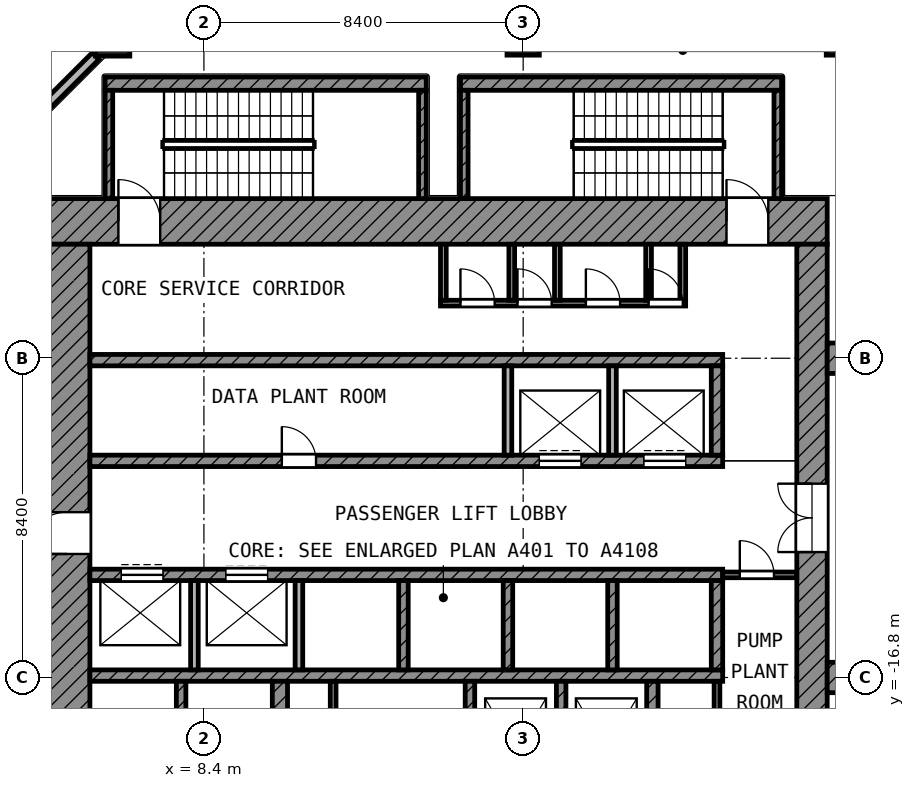
"""IFC4 building model, lengths in metres.
Left out: names, types, materials, properties, quantities, classifications, styles, units other than length and angle.
Written with IfcOpenShell. Run it as: python <this file> out.ifc"""

import sys

from ifc_helpers import new_model, si_unit, direction, frame, frame_2d, origin, origin_2d, place, context, subcontext, project, spatial, rectangle, extrude, element, fill, save


model = new_model("IFC4")
c1 = context("Model", 3, precision=1e-05, world=origin(), true_north=direction((0.0, 1.0)))
c2 = subcontext(c1, "Body", "Model", "MODEL_VIEW")
j1 = project(units=[si_unit("LENGTHUNIT", "METRE"), si_unit("PLANEANGLEUNIT", "RADIAN")], contexts=[c1])
p1 = place(None, origin())
s1 = spatial("IfcSite", under=j1, at=p1, CompositionType="ELEMENT")
p2 = place(p1, origin())
s2 = spatial("IfcBuilding", under=s1, at=p2, CompositionType="ELEMENT")
p3 = place(p2, frame((0.0, 0.0, 213.0)))
s3 = spatial("IfcBuildingStorey", under=s2, at=p3, CompositionType="ELEMENT", Elevation=213.0)
p4 = place(p3, frame((6.0, 0.0, 0.0), z_axis=(0.0, 0.0, 1.0), x_axis=(1.0, 0.0, 0.0)))
e1 = element("IfcColumn", 1, at=p4, inside=s3, PredefinedType="COLUMN", context=c2, shape_type="SweptSolid", body=[
    extrude(rectangle(XDim=0.9, YDim=0.9, at=origin_2d()), origin(), (0.0, 0.0, 1.0), 5.0),
])
for number, where, z_axis, x_axis in (
    (2, (16.8, 0.0, 0.0), (0.0, 0.0, 1.0), (1.0, 0.0, 0.0)),
    (3, (25.2, 0.0, 0.0), (0.0, 0.0, 1.0), (1.0, 0.0, 0.0)),
):
    element("IfcColumn", number, at=place(p3, frame(where, z_axis=z_axis, x_axis=x_axis)), inside=s3, PredefinedType="COLUMN", context=c2, shape_type="SweptSolid", body=[
        extrude(rectangle(XDim=0.85, YDim=0.85, at=origin_2d()), origin(), (0.0, 0.0, 1.0), 5.0),
    ])
for number, where, z_axis, x_axis in (
    (4, (24.8, -8.4, 0.0), (0.0, 0.0, 1.0), (1.0, 0.0, 0.0)),
    (5, (24.8, -16.8, 0.0), (0.0, 0.0, 1.0), (1.0, 0.0, 0.0)),
):
    element("IfcWall", number, at=place(p3, frame(where, z_axis=z_axis, x_axis=x_axis)), inside=s3, PredefinedType="SHEAR", context=c2, shape_type="SweptSolid", body=[
        extrude(rectangle(XDim=8.35, YDim=0.8, at=frame_2d((4.175, 0.0))), origin(), (0.0, 0.0, 1.0), 4.4),
    ])
p5 = place(p3, frame((5.55, -0.45, 0.0), z_axis=(0.0, 0.0, 1.0), x_axis=(-0.707106781187, -0.707106781187, 0.0)))
e6 = element("IfcWall", 6, at=p5, inside=s3, PredefinedType="SOLIDWALL", context=c2, shape_type="SweptSolid", body=[
    extrude(rectangle(XDim=7.213, YDim=0.25, at=frame_2d((3.606, 0.0))), origin(), (0.0, 0.0, 1.0), 3.2),
])
p6 = place(p3, frame((4.2, -4.8, 0.0), z_axis=(0.0, 0.0, 1.0), x_axis=(1.0, 0.0, 0.0)))
e7 = element("IfcWall", 7, at=p6, inside=s3, PredefinedType="SHEAR", context=c2, shape_type="SweptSolid", body=[
    extrude(rectangle(XDim=20.6, YDim=1.2, at=frame_2d((10.3, 0.0))), origin(), (0.0, 0.0, 1.0), 4.4),
])
p7 = place(p6, frame((1.95, 0.0, 0.0)))
e8 = element("IfcOpeningElement", 8, at=p7, cuts=e7, PredefinedType="OPENING", context=c2, shape_type="SweptSolid", body=[
    extrude(rectangle(XDim=1.1, YDim=2.1, at=frame_2d((0.55, 1.05))), frame((0.0, 0.61, 0.0), z_axis=(0.0, -1.0, 0.0), x_axis=(1.0, 0.0, 0.0)), (0.0, 0.0, 1.0), 1.22),
])
p8 = place(p6, frame((17.95, 0.0, 0.0)))
e9 = element("IfcOpeningElement", 9, at=p8, cuts=e7, PredefinedType="OPENING", context=c2, shape_type="SweptSolid", body=[
    extrude(rectangle(XDim=1.1, YDim=2.1, at=frame_2d((0.55, 1.05))), frame((0.0, 0.61, 0.0), z_axis=(0.0, -1.0, 0.0), x_axis=(1.0, 0.0, 0.0)), (0.0, 0.0, 1.0), 1.22),
])
p9 = place(p3, frame((4.8, -24.8, 0.0), z_axis=(0.0, 0.0, 1.0), x_axis=(0.0, 1.0, 0.0)))
e10 = element("IfcWall", 10, at=p9, inside=s3, PredefinedType="SHEAR", context=c2, shape_type="SweptSolid", body=[
    extrude(rectangle(XDim=19.4, YDim=1.2, at=frame_2d((9.7, 0.0))), origin(), (0.0, 0.0, 1.0), 4.4),
])
p10 = place(p9, frame((11.25, 0.0, 0.0)))
e11 = element("IfcOpeningElement", 11, at=p10, cuts=e10, PredefinedType="OPENING", context=c2, shape_type="SweptSolid", body=[
    extrude(rectangle(XDim=1.1, YDim=2.1, at=frame_2d((0.55, 1.05))), frame((0.0, 0.61, 0.0), z_axis=(0.0, -1.0, 0.0), x_axis=(1.0, 0.0, 0.0)), (0.0, 0.0, 1.0), 1.22),
])
p11 = place(p9, frame((1.95, 0.0, 0.0)))
e12 = element("IfcOpeningElement", 12, at=p11, cuts=e10, PredefinedType="OPENING", context=c2, shape_type="SweptSolid", body=[
    extrude(rectangle(XDim=1.1, YDim=2.1, at=frame_2d((0.55, 1.05))), frame((0.0, 0.61, 0.0), z_axis=(0.0, -1.0, 0.0), x_axis=(1.0, 0.0, 0.0)), (0.0, 0.0, 1.0), 1.22),
])
p12 = place(p3, frame((24.4, -24.0, 0.0), z_axis=(0.0, 0.0, 1.0), x_axis=(0.0, 1.0, 0.0)))
e13 = element("IfcWall", 13, at=p12, inside=s3, PredefinedType="SHEAR", context=c2, shape_type="SweptSolid", body=[
    extrude(rectangle(XDim=18.6, YDim=0.8, at=frame_2d((9.3, 0.0))), origin(), (0.0, 0.0, 1.0), 4.4),
])
p13 = place(p12, frame((10.5, 0.0, 0.0)))
e14 = element("IfcOpeningElement", 14, at=p13, cuts=e13, PredefinedType="OPENING", context=c2, shape_type="SweptSolid", body=[
    extrude(rectangle(XDim=1.8, YDim=2.1, at=frame_2d((0.9, 1.05))), frame((0.0, 0.41, 0.0), z_axis=(0.0, -1.0, 0.0), x_axis=(1.0, 0.0, 0.0)), (0.0, 0.0, 1.0), 0.82),
])
p14 = place(p3, frame((5.4, -8.45, 0.0), z_axis=(0.0, 0.0, 1.0), x_axis=(1.0, 0.0, 0.0)))
e15 = element("IfcWall", 15, at=p14, inside=s3, PredefinedType="SHEAR", context=c2, shape_type="SweptSolid", body=[
    extrude(rectangle(XDim=16.65, YDim=0.3, at=frame_2d((8.325, 0.0))), origin(), (0.0, 0.0, 1.0), 4.4),
])
p15 = place(p3, frame((5.4, -11.1, 0.0), z_axis=(0.0, 0.0, 1.0), x_axis=(1.0, 0.0, 0.0)))
e16 = element("IfcWall", 16, at=p15, inside=s3, PredefinedType="SHEAR", context=c2, shape_type="SweptSolid", body=[
    extrude(rectangle(XDim=16.65, YDim=0.3, at=frame_2d((8.325, 0.0))), origin(), (0.0, 0.0, 1.0), 4.4),
])
p16 = place(p15, frame((11.825, 0.0, 0.0)))
e17 = element("IfcOpeningElement", 17, at=p16, cuts=e16, PredefinedType="OPENING", context=c2, shape_type="SweptSolid", body=[
    extrude(rectangle(XDim=1.1, YDim=2.1, at=frame_2d((0.55, 1.05))), frame((0.0, 0.16, 0.0), z_axis=(0.0, -1.0, 0.0), x_axis=(1.0, 0.0, 0.0)), (0.0, 0.0, 1.0), 0.32),
])
p17 = place(p15, frame((14.575, 0.0, 0.0)))
e18 = element("IfcOpeningElement", 18, at=p17, cuts=e16, PredefinedType="OPENING", context=c2, shape_type="SweptSolid", body=[
    extrude(rectangle(XDim=1.1, YDim=2.1, at=frame_2d((0.55, 1.05))), frame((0.0, 0.16, 0.0), z_axis=(0.0, -1.0, 0.0), x_axis=(1.0, 0.0, 0.0)), (0.0, 0.0, 1.0), 0.32),
])
p18 = place(p15, frame((5.05, 0.0, 0.0)))
e19 = element("IfcOpeningElement", 19, at=p18, cuts=e16, PredefinedType="OPENING", context=c2, shape_type="SweptSolid", body=[
    extrude(rectangle(XDim=0.9, YDim=2.1, at=frame_2d((0.45, 1.05))), frame((0.0, 0.16, 0.0), z_axis=(0.0, -1.0, 0.0), x_axis=(1.0, 0.0, 0.0)), (0.0, 0.0, 1.0), 0.32),
])
p19 = place(p3, frame((5.4, -14.1, 0.0), z_axis=(0.0, 0.0, 1.0), x_axis=(1.0, 0.0, 0.0)))
e20 = element("IfcWall", 20, at=p19, inside=s3, PredefinedType="SHEAR", context=c2, shape_type="SweptSolid", body=[
    extrude(rectangle(XDim=16.65, YDim=0.3, at=frame_2d((8.325, 0.0))), origin(), (0.0, 0.0, 1.0), 4.4),
])
p20 = place(p19, frame((0.825, 0.0, 0.0)))
e21 = element("IfcOpeningElement", 21, at=p20, cuts=e20, PredefinedType="OPENING", context=c2, shape_type="SweptSolid", body=[
    extrude(rectangle(XDim=1.1, YDim=2.1, at=frame_2d((0.55, 1.05))), frame((0.0, 0.16, 0.0), z_axis=(0.0, -1.0, 0.0), x_axis=(1.0, 0.0, 0.0)), (0.0, 0.0, 1.0), 0.32),
])
p21 = place(p19, frame((3.575, 0.0, 0.0)))
e22 = element("IfcOpeningElement", 22, at=p21, cuts=e20, PredefinedType="OPENING", context=c2, shape_type="SweptSolid", body=[
    extrude(rectangle(XDim=1.1, YDim=2.1, at=frame_2d((0.55, 1.05))), frame((0.0, 0.16, 0.0), z_axis=(0.0, -1.0, 0.0), x_axis=(1.0, 0.0, 0.0)), (0.0, 0.0, 1.0), 0.32),
])
p22 = place(p3, frame((5.4, -16.75, 0.0), z_axis=(0.0, 0.0, 1.0), x_axis=(1.0, 0.0, 0.0)))
e23 = element("IfcWall", 23, at=p22, inside=s3, PredefinedType="SHEAR", context=c2, shape_type="SweptSolid", body=[
    extrude(rectangle(XDim=16.65, YDim=0.3, at=frame_2d((8.325, 0.0))), origin(), (0.0, 0.0, 1.0), 4.4),
])
p23 = place(p3, frame((10.4, -20.05, 0.0), z_axis=(0.0, 0.0, 1.0), x_axis=(0.0, 1.0, 0.0)))
e24 = element("IfcWall", 24, at=p23, inside=s3, PredefinedType="SHEAR", context=c2, shape_type="SweptSolid", body=[
    extrude(rectangle(XDim=3.15, YDim=0.4, at=frame_2d((1.575, 0.0))), origin(), (0.0, 0.0, 1.0), 4.4),
])
p24 = place(p3, frame((20.2, -20.35, 0.0), z_axis=(0.0, 0.0, 1.0), x_axis=(0.0, 1.0, 0.0)))
e25 = element("IfcWall", 25, at=p24, inside=s3, PredefinedType="SHEAR", context=c2, shape_type="SweptSolid", body=[
    extrude(rectangle(XDim=3.45, YDim=0.3, at=frame_2d((1.725, 0.0))), origin(), (0.0, 0.0, 1.0), 4.4),
])
p25 = place(p3, frame((21.9, -10.95, 0.0), z_axis=(0.0, 0.0, 1.0), x_axis=(0.0, 1.0, 0.0)))
e26 = element("IfcWall", 26, at=p25, inside=s3, PredefinedType="SHEAR", context=c2, shape_type="SweptSolid", body=[
    extrude(rectangle(XDim=2.35, YDim=0.3, at=frame_2d((1.175, 0.0))), origin(), (0.0, 0.0, 1.0), 4.4),
])
p26 = place(p3, frame((21.9, -16.6, 0.0), z_axis=(0.0, 0.0, 1.0), x_axis=(0.0, 1.0, 0.0)))
e27 = element("IfcWall", 27, at=p26, inside=s3, PredefinedType="SHEAR", context=c2, shape_type="SweptSolid", body=[
    extrude(rectangle(XDim=2.35, YDim=0.3, at=frame_2d((1.175, 0.0))), origin(), (0.0, 0.0, 1.0), 4.4),
])
for number, where, z_axis, x_axis in (
    (28, (7.8, -20.05, 0.0), (0.0, 0.0, 1.0), (0.0, 1.0, 0.0)),
    (29, (15.4, -20.05, 0.0), (0.0, 0.0, 1.0), (0.0, 1.0, 0.0)),
    (30, (17.8, -20.05, 0.0), (0.0, 0.0, 1.0), (0.0, 1.0, 0.0)),
):
    element("IfcWall", number, at=place(p3, frame(where, z_axis=z_axis, x_axis=x_axis)), inside=s3, PredefinedType="SHEAR", context=c2, shape_type="SweptSolid", body=[
        extrude(rectangle(XDim=3.15, YDim=0.25, at=frame_2d((1.575, 0.0))), origin(), (0.0, 0.0, 1.0), 4.4),
    ])
for number, where, z_axis, x_axis in (
    (31, (16.4, -10.95, 0.0), (0.0, 0.0, 1.0), (0.0, 1.0, 0.0)),
    (32, (19.15, -10.95, 0.0), (0.0, 0.0, 1.0), (0.0, 1.0, 0.0)),
):
    element("IfcWall", number, at=place(p3, frame(where, z_axis=z_axis, x_axis=x_axis)), inside=s3, PredefinedType="PARTITIONING", context=c2, shape_type="SweptSolid", body=[
        extrude(rectangle(XDim=2.35, YDim=0.2, at=frame_2d((1.175, 0.0))), origin(), (0.0, 0.0, 1.0), 4.4),
    ])
for number, where, z_axis, x_axis in (
    (33, (8.15, -16.6, 0.0), (0.0, 0.0, 1.0), (0.0, 1.0, 0.0)),
    (34, (10.9, -16.6, 0.0), (0.0, 0.0, 1.0), (0.0, 1.0, 0.0)),
):
    element("IfcWall", number, at=place(p3, frame(where, z_axis=z_axis, x_axis=x_axis)), inside=s3, PredefinedType="PARTITIONING", context=c2, shape_type="SweptSolid", body=[
        extrude(rectangle(XDim=2.35, YDim=0.2, at=frame_2d((1.175, 0.0))), origin(), (0.0, 0.0, 1.0), 4.4),
    ])
for number, where, z_axis, x_axis in (
    (35, (13.65, -16.6, 0.0), (0.0, 0.0, 1.0), (0.0, 1.0, 0.0)),
    (36, (16.4, -16.6, 0.0), (0.0, 0.0, 1.0), (0.0, 1.0, 0.0)),
    (37, (19.15, -16.6, 0.0), (0.0, 0.0, 1.0), (0.0, 1.0, 0.0)),
):
    element("IfcWall", number, at=place(p3, frame(where, z_axis=z_axis, x_axis=x_axis)), inside=s3, PredefinedType="SHEAR", context=c2, shape_type="SweptSolid", body=[
        extrude(rectangle(XDim=2.35, YDim=0.25, at=frame_2d((1.175, 0.0))), origin(), (0.0, 0.0, 1.0), 4.4),
    ])
p27 = place(p3, frame((21.9, -19.05, 0.0), z_axis=(0.0, 0.0, 1.0), x_axis=(0.0, 1.0, 0.0)))
e38 = element("IfcWall", 38, at=p27, inside=s3, PredefinedType="PARTITIONING", context=c2, shape_type="SweptSolid", body=[
    extrude(rectangle(XDim=2.15, YDim=0.15, at=frame_2d((1.075, 0.0))), origin(), (0.0, 0.0, 1.0), 4.4),
])
p28 = place(p3, frame((22.05, -14.1, 0.0), z_axis=(0.0, 0.0, 1.0), x_axis=(1.0, 0.0, 0.0)))
e39 = element("IfcWall", 39, at=p28, inside=s3, PredefinedType="PARTITIONING", context=c2, shape_type="SweptSolid", body=[
    extrude(rectangle(XDim=1.95, YDim=0.15, at=frame_2d((0.975, 0.0))), origin(), (0.0, 0.0, 1.0), 4.4),
])
p29 = place(p28, frame((0.45, 0.0, 0.0)))
e40 = element("IfcOpeningElement", 40, at=p29, cuts=e39, PredefinedType="OPENING", context=c2, shape_type="SweptSolid", body=[
    extrude(rectangle(XDim=0.9, YDim=2.1, at=frame_2d((0.45, 1.05))), frame((0.0, 0.085, 0.0), z_axis=(0.0, -1.0, 0.0), x_axis=(1.0, 0.0, 0.0)), (0.0, 0.0, 1.0), 0.17),
])
p30 = place(p3, frame((14.625, -6.95, 0.0), z_axis=(0.0, 0.0, 1.0), x_axis=(1.0, 0.0, 0.0)))
e41 = element("IfcWall", 41, at=p30, inside=s3, PredefinedType="PARTITIONING", context=c2, shape_type="SweptSolid", body=[
    extrude(rectangle(XDim=6.45, YDim=0.15, at=frame_2d((3.225, 0.0))), origin(), (0.0, 0.0, 1.0), 4.4),
])
p31 = place(p30, frame((0.525, 0.0, 0.0)))
e42 = element("IfcOpeningElement", 42, at=p31, cuts=e41, PredefinedType="OPENING", context=c2, shape_type="SweptSolid", body=[
    extrude(rectangle(XDim=0.9, YDim=2.1, at=frame_2d((0.45, 1.05))), frame((0.0, 0.085, 0.0), z_axis=(0.0, -1.0, 0.0), x_axis=(1.0, 0.0, 0.0)), (0.0, 0.0, 1.0), 0.17),
])
p32 = place(p30, frame((2.025, 0.0, 0.0)))
e43 = element("IfcOpeningElement", 43, at=p32, cuts=e41, PredefinedType="OPENING", context=c2, shape_type="SweptSolid", body=[
    extrude(rectangle(XDim=0.9, YDim=2.1, at=frame_2d((0.45, 1.05))), frame((0.0, 0.085, 0.0), z_axis=(0.0, -1.0, 0.0), x_axis=(1.0, 0.0, 0.0)), (0.0, 0.0, 1.0), 0.17),
])
p33 = place(p30, frame((3.825, 0.0, 0.0)))
e44 = element("IfcOpeningElement", 44, at=p33, cuts=e41, PredefinedType="OPENING", context=c2, shape_type="SweptSolid", body=[
    extrude(rectangle(XDim=0.9, YDim=2.1, at=frame_2d((0.45, 1.05))), frame((0.0, 0.085, 0.0), z_axis=(0.0, -1.0, 0.0), x_axis=(1.0, 0.0, 0.0)), (0.0, 0.0, 1.0), 0.17),
])
p34 = place(p30, frame((5.475, 0.0, 0.0)))
e45 = element("IfcOpeningElement", 45, at=p34, cuts=e41, PredefinedType="OPENING", context=c2, shape_type="SweptSolid", body=[
    extrude(rectangle(XDim=0.9, YDim=2.1, at=frame_2d((0.45, 1.05))), frame((0.0, 0.085, 0.0), z_axis=(0.0, -1.0, 0.0), x_axis=(1.0, 0.0, 0.0)), (0.0, 0.0, 1.0), 0.17),
])
p35 = place(p3, frame((11.8, -20.05, 0.0), z_axis=(0.0, 0.0, 1.0), x_axis=(0.0, 1.0, 0.0)))
e46 = element("IfcWall", 46, at=p35, inside=s3, PredefinedType="PARTITIONING", context=c2, shape_type="SweptSolid", body=[
    extrude(rectangle(XDim=3.15, YDim=0.15, at=frame_2d((1.575, 0.0))), origin(), (0.0, 0.0, 1.0), 4.4),
])
for number, where, z_axis, x_axis in (
    (47, (14.7, -6.875, 0.0), (0.0, 0.0, 1.0), (0.0, 1.0, 0.0)),
    (48, (16.5, -6.875, 0.0), (0.0, 0.0, 1.0), (0.0, 1.0, 0.0)),
    (49, (17.7, -6.875, 0.0), (0.0, 0.0, 1.0), (0.0, 1.0, 0.0)),
    (50, (20.1, -6.875, 0.0), (0.0, 0.0, 1.0), (0.0, 1.0, 0.0)),
    (51, (21.0, -6.875, 0.0), (0.0, 0.0, 1.0), (0.0, 1.0, 0.0)),
):
    element("IfcWall", number, at=place(p3, frame(where, z_axis=z_axis, x_axis=x_axis)), inside=s3, PredefinedType="PARTITIONING", context=c2, shape_type="SweptSolid", body=[
        extrude(rectangle(XDim=1.475, YDim=0.15, at=frame_2d((0.738, 0.0))), origin(), (0.0, 0.0, 1.0), 4.4),
    ])
p36 = place(p3, frame((5.8, -1.175, 0.0), z_axis=(0.0, 0.0, 1.0), x_axis=(1.0, 0.0, 0.0)))
e52 = element("IfcWall", 52, at=p36, inside=s3, PredefinedType="SHEAR", context=c2, shape_type="SweptSolid", body=[
    extrude(rectangle(XDim=8.45, YDim=0.35, at=frame_2d((4.225, 0.0))), origin(), (0.0, 0.0, 1.0), 4.4),
])
for number, where, z_axis, x_axis in (
    (53, (5.9, -4.2, 0.0), (0.0, 0.0, 1.0), (0.0, 1.0, 0.0)),
    (54, (14.15, -4.2, 0.0), (0.0, 0.0, 1.0), (0.0, 1.0, 0.0)),
):
    element("IfcWall", number, at=place(p3, frame(where, z_axis=z_axis, x_axis=x_axis)), inside=s3, PredefinedType="SHEAR", context=c2, shape_type="SweptSolid", body=[
        extrude(rectangle(XDim=2.85, YDim=0.2, at=frame_2d((1.425, 0.0))), origin(), (0.0, 0.0, 1.0), 4.4),
    ])
p37 = place(p3, frame((15.15, -1.175, 0.0), z_axis=(0.0, 0.0, 1.0), x_axis=(1.0, 0.0, 0.0)))
e55 = element("IfcWall", 55, at=p37, inside=s3, PredefinedType="SHEAR", context=c2, shape_type="SweptSolid", body=[
    extrude(rectangle(XDim=8.45, YDim=0.35, at=frame_2d((4.225, 0.0))), origin(), (0.0, 0.0, 1.0), 4.4),
])
for number, where, z_axis, x_axis in (
    (56, (15.25, -4.2, 0.0), (0.0, 0.0, 1.0), (0.0, 1.0, 0.0)),
    (57, (23.5, -4.2, 0.0), (0.0, 0.0, 1.0), (0.0, 1.0, 0.0)),
):
    element("IfcWall", number, at=place(p3, frame(where, z_axis=z_axis, x_axis=x_axis)), inside=s3, PredefinedType="SHEAR", context=c2, shape_type="SweptSolid", body=[
        extrude(rectangle(XDim=2.85, YDim=0.2, at=frame_2d((1.425, 0.0))), origin(), (0.0, 0.0, 1.0), 4.4),
    ])
p38 = place(p16, origin())
e58 = element("IfcDoor", 58, at=p38, inside=s3, OperationType="DOUBLE_DOOR_SLIDING", PredefinedType="DOOR", context=c2, shape_type="SweptSolid", body=[
    extrude(rectangle(XDim=1.1, YDim=2.1, at=frame_2d((0.55, 1.05))), frame((0.0, 0.025, 0.0), z_axis=(0.0, -1.0, 0.0), x_axis=(1.0, 0.0, 0.0)), (0.0, 0.0, 1.0), 0.05),
])
fill(e17, e58)
p39 = place(p17, origin())
e59 = element("IfcDoor", 59, at=p39, inside=s3, OperationType="DOUBLE_DOOR_SLIDING", PredefinedType="DOOR", context=c2, shape_type="SweptSolid", body=[
    extrude(rectangle(XDim=1.1, YDim=2.1, at=frame_2d((0.55, 1.05))), frame((0.0, 0.025, 0.0), z_axis=(0.0, -1.0, 0.0), x_axis=(1.0, 0.0, 0.0)), (0.0, 0.0, 1.0), 0.05),
])
fill(e18, e59)
p40 = place(p20, origin())
e60 = element("IfcDoor", 60, at=p40, inside=s3, OperationType="DOUBLE_DOOR_SLIDING", PredefinedType="DOOR", context=c2, shape_type="SweptSolid", body=[
    extrude(rectangle(XDim=1.1, YDim=2.1, at=frame_2d((0.55, 1.05))), frame((0.0, 0.025, 0.0), z_axis=(0.0, -1.0, 0.0), x_axis=(1.0, 0.0, 0.0)), (0.0, 0.0, 1.0), 0.05),
])
fill(e21, e60)
p41 = place(p21, origin())
e61 = element("IfcDoor", 61, at=p41, inside=s3, OperationType="DOUBLE_DOOR_SLIDING", PredefinedType="DOOR", context=c2, shape_type="SweptSolid", body=[
    extrude(rectangle(XDim=1.1, YDim=2.1, at=frame_2d((0.55, 1.05))), frame((0.0, 0.025, 0.0), z_axis=(0.0, -1.0, 0.0), x_axis=(1.0, 0.0, 0.0)), (0.0, 0.0, 1.0), 0.05),
])
fill(e22, e61)
p42 = place(p10, origin())
e62 = element("IfcDoor", 62, at=p42, inside=s3, OperationType="SINGLE_SWING_LEFT", PredefinedType="DOOR", context=c2, shape_type="SweptSolid", body=[
    extrude(rectangle(XDim=1.1, YDim=2.1, at=frame_2d((0.55, 1.05))), frame((0.0, 0.025, 0.0), z_axis=(0.0, -1.0, 0.0), x_axis=(1.0, 0.0, 0.0)), (0.0, 0.0, 1.0), 0.05),
])
fill(e11, e62)
p43 = place(p7, origin())
e63 = element("IfcDoor", 63, at=p43, inside=s3, OperationType="SINGLE_SWING_LEFT", PredefinedType="DOOR", context=c2, shape_type="SweptSolid", body=[
    extrude(rectangle(XDim=1.1, YDim=2.1, at=frame_2d((0.55, 1.05))), frame((0.0, 0.025, 0.0), z_axis=(0.0, -1.0, 0.0), x_axis=(1.0, 0.0, 0.0)), (0.0, 0.0, 1.0), 0.05),
])
fill(e8, e63)
p44 = place(p8, origin())
e64 = element("IfcDoor", 64, at=p44, inside=s3, OperationType="SINGLE_SWING_LEFT", PredefinedType="DOOR", context=c2, shape_type="SweptSolid", body=[
    extrude(rectangle(XDim=1.1, YDim=2.1, at=frame_2d((0.55, 1.05))), frame((0.0, 0.025, 0.0), z_axis=(0.0, -1.0, 0.0), x_axis=(1.0, 0.0, 0.0)), (0.0, 0.0, 1.0), 0.05),
])
fill(e9, e64)
p45 = place(p13, origin())
e65 = element("IfcDoor", 65, at=p45, inside=s3, OperationType="DOUBLE_DOOR_SINGLE_SWING", PredefinedType="DOOR", context=c2, shape_type="SweptSolid", body=[
    extrude(rectangle(XDim=1.8, YDim=2.1, at=frame_2d((0.9, 1.05))), frame((0.0, 0.025, 0.0), z_axis=(0.0, -1.0, 0.0), x_axis=(1.0, 0.0, 0.0)), (0.0, 0.0, 1.0), 0.05),
])
fill(e14, e65)
p46 = place(p31, origin())
e66 = element("IfcDoor", 66, at=p46, inside=s3, OperationType="SINGLE_SWING_LEFT", PredefinedType="DOOR", context=c2, shape_type="SweptSolid", body=[
    extrude(rectangle(XDim=0.9, YDim=2.1, at=frame_2d((0.45, 1.05))), frame((0.0, 0.025, 0.0), z_axis=(0.0, -1.0, 0.0), x_axis=(1.0, 0.0, 0.0)), (0.0, 0.0, 1.0), 0.05),
])
fill(e42, e66)
p47 = place(p32, origin())
e67 = element("IfcDoor", 67, at=p47, inside=s3, OperationType="SINGLE_SWING_LEFT", PredefinedType="DOOR", context=c2, shape_type="SweptSolid", body=[
    extrude(rectangle(XDim=0.9, YDim=2.1, at=frame_2d((0.45, 1.05))), frame((0.0, 0.025, 0.0), z_axis=(0.0, -1.0, 0.0), x_axis=(1.0, 0.0, 0.0)), (0.0, 0.0, 1.0), 0.05),
])
fill(e43, e67)
p48 = place(p33, origin())
e68 = element("IfcDoor", 68, at=p48, inside=s3, OperationType="SINGLE_SWING_LEFT", PredefinedType="DOOR", context=c2, shape_type="SweptSolid", body=[
    extrude(rectangle(XDim=0.9, YDim=2.1, at=frame_2d((0.45, 1.05))), frame((0.0, 0.025, 0.0), z_axis=(0.0, -1.0, 0.0), x_axis=(1.0, 0.0, 0.0)), (0.0, 0.0, 1.0), 0.05),
])
fill(e44, e68)
p49 = place(p34, origin())
e69 = element("IfcDoor", 69, at=p49, inside=s3, OperationType="SINGLE_SWING_LEFT", PredefinedType="DOOR", context=c2, shape_type="SweptSolid", body=[
    extrude(rectangle(XDim=0.9, YDim=2.1, at=frame_2d((0.45, 1.05))), frame((0.0, 0.025, 0.0), z_axis=(0.0, -1.0, 0.0), x_axis=(1.0, 0.0, 0.0)), (0.0, 0.0, 1.0), 0.05),
])
fill(e45, e69)
p50 = place(p29, origin())
e70 = element("IfcDoor", 70, at=p50, inside=s3, OperationType="SINGLE_SWING_LEFT", PredefinedType="DOOR", context=c2, shape_type="SweptSolid", body=[
    extrude(rectangle(XDim=0.9, YDim=2.1, at=frame_2d((0.45, 1.05))), frame((0.0, 0.025, 0.0), z_axis=(0.0, -1.0, 0.0), x_axis=(1.0, 0.0, 0.0)), (0.0, 0.0, 1.0), 0.05),
])
fill(e40, e70)
p51 = place(p18, origin())
e71 = element("IfcDoor", 71, at=p51, inside=s3, OperationType="SINGLE_SWING_LEFT", PredefinedType="DOOR", context=c2, shape_type="SweptSolid", body=[
    extrude(rectangle(XDim=0.9, YDim=2.1, at=frame_2d((0.45, 1.05))), frame((0.0, 0.025, 0.0), z_axis=(0.0, -1.0, 0.0), x_axis=(1.0, 0.0, 0.0)), (0.0, 0.0, 1.0), 0.05),
])
fill(e19, e71)
save(model, sys.argv[1])
